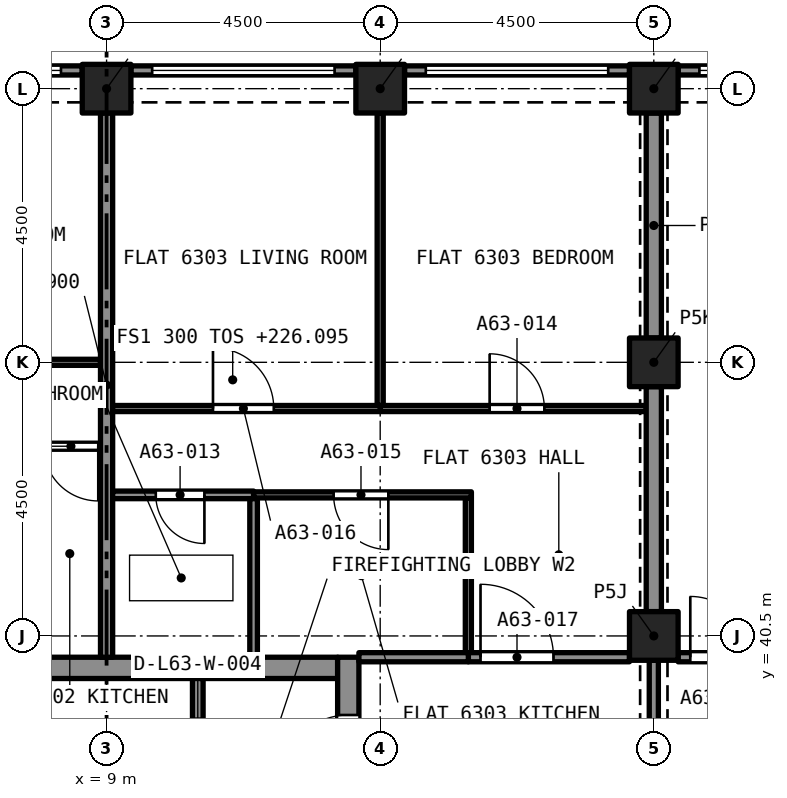
"""IFC4 building model, lengths in metres.
Left out: names, types, materials, properties, quantities, classifications, styles, units other than length and angle.
Written with IfcOpenShell. Run it as: python <this file> out.ifc"""

import sys

from ifc_helpers import new_model, si_unit, direction, frame, frame_2d, origin, origin_2d, place, context, subcontext, project, spatial, rectangle, extrude, element, fill, save


model = new_model("IFC4")
c1 = context("Model", 3, precision=1e-05, world=origin(), true_north=direction((0.0, 1.0)))
c2 = subcontext(c1, "Body", "Model", "MODEL_VIEW")
j1 = project(units=[si_unit("LENGTHUNIT", "METRE"), si_unit("PLANEANGLEUNIT", "RADIAN")], contexts=[c1])
p1 = place(None, origin())
s1 = spatial("IfcSite", under=j1, at=p1, CompositionType="ELEMENT")
p2 = place(p1, origin())
s2 = spatial("IfcBuilding", under=s1, at=p2, CompositionType="ELEMENT")
p3 = place(p2, frame((0.0, 0.0, 226.095)))
s3 = spatial("IfcBuildingStorey", under=s2, at=p3, CompositionType="ELEMENT", Elevation=226.095)
for number, where, z_axis, x_axis in (
    (1, (18.0, 40.5, 0.0), (0.0, 0.0, 1.0), (1.0, 0.0, 0.0)),
    (2, (18.0, 45.0, 0.0), (0.0, 0.0, 1.0), (1.0, 0.0, 0.0)),
    (3, (9.0, 49.5, 0.0), (0.0, 0.0, 1.0), (1.0, 0.0, 0.0)),
    (4, (13.5, 49.5, 0.0), (0.0, 0.0, 1.0), (1.0, 0.0, 0.0)),
    (5, (18.0, 49.5, 0.0), (0.0, 0.0, 1.0), (1.0, 0.0, 0.0)),
):
    element("IfcColumn", number, at=place(p3, frame(where, z_axis=z_axis, x_axis=x_axis)), inside=s3, PredefinedType="COLUMN", context=c2, shape_type="SweptSolid", body=[
        extrude(rectangle(XDim=0.8, YDim=0.8, at=origin_2d()), origin(), (0.0, 0.0, 1.0), 3.2),
    ])
p4 = place(p3, frame((5.2, 39.975, 0.0), z_axis=(0.0, 0.0, 1.0), x_axis=(1.0, 0.0, 0.0)))
e6 = element("IfcWall", 6, at=p4, inside=s3, PredefinedType="SOLIDWALL", context=c2, shape_type="SweptSolid", body=[
    extrude(rectangle(XDim=7.6, YDim=0.35, at=frame_2d((3.8, 0.0))), origin(), (0.0, 0.0, 1.0), 3.2),
])
p5 = place(p3, frame((12.975, 27.35, 0.0), z_axis=(0.0, 0.0, 1.0), x_axis=(0.0, 1.0, 0.0)))
e7 = element("IfcWall", 7, at=p5, inside=s3, PredefinedType="SOLIDWALL", context=c2, shape_type="SweptSolid", body=[
    extrude(rectangle(XDim=12.8, YDim=0.35, at=frame_2d((6.4, 0.0))), origin(), (0.0, 0.0, 1.0), 3.2),
])
p6 = place(p5, frame((10.75, 0.0, 0.0)))
e8 = element("IfcOpeningElement", 8, at=p6, cuts=e7, PredefinedType="OPENING", context=c2, shape_type="SweptSolid", body=[
    extrude(rectangle(XDim=1.1, YDim=2.1, at=frame_2d((0.55, 1.05))), frame((0.0, 0.185, 0.0), z_axis=(0.0, -1.0, 0.0), x_axis=(1.0, 0.0, 0.0)), (0.0, 0.0, 1.0), 0.37),
])
p7 = place(p5, frame((8.6, 0.0, 0.0)))
e9 = element("IfcOpeningElement", 9, at=p7, cuts=e7, PredefinedType="OPENING", context=c2, shape_type="SweptSolid", body=[
    extrude(rectangle(XDim=1.2, YDim=2.1, at=frame_2d((0.6, 1.05))), frame((0.0, 0.185, 0.0), z_axis=(0.0, -1.0, 0.0), x_axis=(1.0, 0.0, 0.0)), (0.0, 0.0, 1.0), 0.37),
])
p8 = place(p3, frame((18.4, 49.8, 0.0), z_axis=(0.0, 0.0, 1.0), x_axis=(1.0, 0.0, 0.0)))
e10 = element("IfcWall", 10, at=p8, inside=s3, PredefinedType="SOLIDWALL", context=c2, shape_type="SweptSolid", body=[
    extrude(rectangle(XDim=3.7, YDim=0.15, at=frame_2d((1.85, 0.0))), origin(), (0.0, 0.0, 1.0), 3.2),
])
p9 = place(p8, frame((0.35, 0.0, 0.45)))
e11 = element("IfcOpeningElement", 11, at=p9, cuts=e10, PredefinedType="OPENING", context=c2, shape_type="SweptSolid", body=[
    extrude(rectangle(XDim=3.0, YDim=1.95, at=frame_2d((1.5, 0.975))), frame((0.0, 0.085, 0.0), z_axis=(0.0, -1.0, 0.0), x_axis=(1.0, 0.0, 0.0)), (0.0, 0.0, 1.0), 0.17),
])
p10 = place(p3, frame((13.9, 49.8, 0.0), z_axis=(0.0, 0.0, 1.0), x_axis=(1.0, 0.0, 0.0)))
e12 = element("IfcWall", 12, at=p10, inside=s3, PredefinedType="SOLIDWALL", context=c2, shape_type="SweptSolid", body=[
    extrude(rectangle(XDim=3.7, YDim=0.15, at=frame_2d((1.85, 0.0))), origin(), (0.0, 0.0, 1.0), 3.2),
])
p11 = place(p10, frame((0.35, 0.0, 0.45)))
e13 = element("IfcOpeningElement", 13, at=p11, cuts=e12, PredefinedType="OPENING", context=c2, shape_type="SweptSolid", body=[
    extrude(rectangle(XDim=3.0, YDim=1.95, at=frame_2d((1.5, 0.975))), frame((0.0, 0.085, 0.0), z_axis=(0.0, -1.0, 0.0), x_axis=(1.0, 0.0, 0.0)), (0.0, 0.0, 1.0), 0.17),
])
p12 = place(p3, frame((9.4, 49.8, 0.0), z_axis=(0.0, 0.0, 1.0), x_axis=(1.0, 0.0, 0.0)))
e14 = element("IfcWall", 14, at=p12, inside=s3, PredefinedType="SOLIDWALL", context=c2, shape_type="SweptSolid", body=[
    extrude(rectangle(XDim=3.7, YDim=0.15, at=frame_2d((1.85, 0.0))), origin(), (0.0, 0.0, 1.0), 3.2),
])
p13 = place(p12, frame((0.35, 0.0, 0.45)))
e15 = element("IfcOpeningElement", 15, at=p13, cuts=e14, PredefinedType="OPENING", context=c2, shape_type="SweptSolid", body=[
    extrude(rectangle(XDim=3.0, YDim=1.95, at=frame_2d((1.5, 0.975))), frame((0.0, 0.085, 0.0), z_axis=(0.0, -1.0, 0.0), x_axis=(1.0, 0.0, 0.0)), (0.0, 0.0, 1.0), 0.17),
])
p14 = place(p3, frame((4.9, 49.8, 0.0), z_axis=(0.0, 0.0, 1.0), x_axis=(1.0, 0.0, 0.0)))
e16 = element("IfcWall", 16, at=p14, inside=s3, PredefinedType="SOLIDWALL", context=c2, shape_type="SweptSolid", body=[
    extrude(rectangle(XDim=3.7, YDim=0.15, at=frame_2d((1.85, 0.0))), origin(), (0.0, 0.0, 1.0), 3.2),
])
p15 = place(p14, frame((0.35, 0.0, 0.45)))
e17 = element("IfcOpeningElement", 17, at=p15, cuts=e16, PredefinedType="OPENING", context=c2, shape_type="SweptSolid", body=[
    extrude(rectangle(XDim=3.0, YDim=1.95, at=frame_2d((1.5, 0.975))), frame((0.0, 0.085, 0.0), z_axis=(0.0, -1.0, 0.0), x_axis=(1.0, 0.0, 0.0)), (0.0, 0.0, 1.0), 0.17),
])
p16 = place(p3, frame((4.5, 45.0, 0.0), z_axis=(0.0, 0.0, 1.0), x_axis=(1.0, 0.0, 0.0)))
e18 = element("IfcWall", 18, at=p16, inside=s3, PredefinedType="PARTITIONING", context=c2, shape_type="SweptSolid", body=[
    extrude(rectangle(XDim=4.4, YDim=0.1, at=frame_2d((2.2, 0.0))), origin(), (0.0, 0.0, 1.0), 2.9),
])
p17 = place(p16, frame((1.8, 0.0, 0.0)))
e19 = element("IfcOpeningElement", 19, at=p17, cuts=e18, PredefinedType="OPENING", context=c2, shape_type="SweptSolid", body=[
    extrude(rectangle(XDim=0.9, YDim=2.1, at=frame_2d((0.45, 1.05))), frame((0.0, 0.06, 0.0), z_axis=(0.0, -1.0, 0.0), x_axis=(1.0, 0.0, 0.0)), (0.0, 0.0, 1.0), 0.12),
])
p18 = place(p3, frame((8.9, 43.62, 0.0), z_axis=(0.0, 0.0, 1.0), x_axis=(-1.0, 0.0, 0.0)))
e20 = element("IfcWall", 20, at=p18, inside=s3, PredefinedType="PARTITIONING", context=c2, shape_type="SweptSolid", body=[
    extrude(rectangle(XDim=1.073, YDim=0.1, at=frame_2d((0.536, 0.0))), origin(), (0.0, 0.0, 1.0), 2.9),
])
p19 = place(p18, frame((0.036, 0.0, 0.0)))
e21 = element("IfcOpeningElement", 21, at=p19, cuts=e20, PredefinedType="OPENING", context=c2, shape_type="SweptSolid", body=[
    extrude(rectangle(XDim=0.9, YDim=2.1, at=frame_2d((0.45, 1.05))), frame((0.0, 0.06, 0.0), z_axis=(0.0, -1.0, 0.0), x_axis=(1.0, 0.0, 0.0)), (0.0, 0.0, 1.0), 0.12),
])
p20 = place(p3, frame((9.0, 40.15, 0.0), z_axis=(0.0, 0.0, 1.0), x_axis=(0.0, 1.0, 0.0)))
e22 = element("IfcWall", 22, at=p20, inside=s3, PredefinedType="PARTITIONING", context=c2, shape_type="SweptSolid", body=[
    extrude(rectangle(XDim=8.95, YDim=0.2, at=frame_2d((4.475, 0.0))), origin(), (0.0, 0.0, 1.0), 2.9),
])
p21 = place(p3, frame((11.418, 42.82, 0.0), z_axis=(0.0, 0.0, 1.0), x_axis=(-1.0, 0.0, 0.0)))
e23 = element("IfcWall", 23, at=p21, inside=s3, PredefinedType="PARTITIONING", context=c2, shape_type="SweptSolid", body=[
    extrude(rectangle(XDim=2.318, YDim=0.125, at=frame_2d((1.159, 0.0))), origin(), (0.0, 0.0, 1.0), 2.9),
])
p22 = place(p21, frame((0.809, 0.0, 0.0)))
e24 = element("IfcOpeningElement", 24, at=p22, cuts=e23, PredefinedType="OPENING", context=c2, shape_type="SweptSolid", body=[
    extrude(rectangle(XDim=0.8, YDim=2.1, at=frame_2d((0.4, 1.05))), frame((0.0, 0.073, 0.0), z_axis=(0.0, -1.0, 0.0), x_axis=(1.0, 0.0, 0.0)), (0.0, 0.0, 1.0), 0.145),
])
p23 = place(p3, frame((11.418, 40.15, 0.0), z_axis=(0.0, 0.0, 1.0), x_axis=(0.0, 1.0, 0.0)))
e25 = element("IfcWall", 25, at=p23, inside=s3, PredefinedType="PARTITIONING", context=c2, shape_type="SweptSolid", body=[
    extrude(rectangle(XDim=2.608, YDim=0.125, at=frame_2d((1.304, 0.0))), origin(), (0.0, 0.0, 1.0), 2.9),
])
p24 = place(p3, frame((13.5, 44.24, 0.0), z_axis=(0.0, 0.0, 1.0), x_axis=(1.0, 0.0, 0.0)))
e26 = element("IfcWall", 26, at=p24, inside=s3, PredefinedType="PARTITIONING", context=c2, shape_type="SweptSolid", body=[
    extrude(rectangle(XDim=4.375, YDim=0.1, at=frame_2d((2.188, 0.0))), origin(), (0.0, 0.0, 1.0), 2.9),
])
p25 = place(p24, frame((1.8, 0.0, 0.0)))
e27 = element("IfcOpeningElement", 27, at=p25, cuts=e26, PredefinedType="OPENING", context=c2, shape_type="SweptSolid", body=[
    extrude(rectangle(XDim=0.9, YDim=2.1, at=frame_2d((0.45, 1.05))), frame((0.0, 0.06, 0.0), z_axis=(0.0, -1.0, 0.0), x_axis=(1.0, 0.0, 0.0)), (0.0, 0.0, 1.0), 0.12),
])
p26 = place(p3, frame((13.5, 44.29, 0.0), z_axis=(0.0, 0.0, 1.0), x_axis=(0.0, 1.0, 0.0)))
e28 = element("IfcWall", 28, at=p26, inside=s3, PredefinedType="PARTITIONING", context=c2, shape_type="SweptSolid", body=[
    extrude(rectangle(XDim=4.81, YDim=0.1, at=frame_2d((2.405, 0.0))), origin(), (0.0, 0.0, 1.0), 2.9),
])
p27 = place(p3, frame((18.0, 45.4, 0.0), z_axis=(0.0, 0.0, 1.0), x_axis=(0.0, 1.0, 0.0)))
e29 = element("IfcWall", 29, at=p27, inside=s3, PredefinedType="PARTITIONING", context=c2, shape_type="SweptSolid", body=[
    extrude(rectangle(XDim=3.7, YDim=0.25, at=frame_2d((1.85, 0.0))), origin(), (0.0, 0.0, 1.0), 2.38),
])
p28 = place(p3, frame((14.95, 40.225, 0.0), z_axis=(0.0, 0.0, 1.0), x_axis=(0.0, 1.0, 0.0)))
e30 = element("IfcWall", 30, at=p28, inside=s3, PredefinedType="PARTITIONING", context=c2, shape_type="SweptSolid", body=[
    extrude(rectangle(XDim=2.545, YDim=0.1, at=frame_2d((1.272, 0.0))), origin(), (0.0, 0.0, 1.0), 2.9),
])
p29 = place(p3, frame((15.0, 42.82, 0.0), z_axis=(0.0, 0.0, 1.0), x_axis=(-1.0, 0.0, 0.0)))
e31 = element("IfcWall", 31, at=p29, inside=s3, PredefinedType="PARTITIONING", context=c2, shape_type="SweptSolid", body=[
    extrude(rectangle(XDim=3.582, YDim=0.1, at=frame_2d((1.791, 0.0))), origin(), (0.0, 0.0, 1.0), 2.9),
])
p30 = place(p29, frame((1.366, 0.0, 0.0)))
e32 = element("IfcOpeningElement", 32, at=p30, cuts=e31, PredefinedType="OPENING", context=c2, shape_type="SweptSolid", body=[
    extrude(rectangle(XDim=0.9, YDim=2.1, at=frame_2d((0.45, 1.05))), frame((0.0, 0.06, 0.0), z_axis=(0.0, -1.0, 0.0), x_axis=(1.0, 0.0, 0.0)), (0.0, 0.0, 1.0), 0.12),
])
p31 = place(p3, frame((9.1, 44.24, 0.0), z_axis=(0.0, 0.0, 1.0), x_axis=(1.0, 0.0, 0.0)))
e33 = element("IfcWall", 33, at=p31, inside=s3, PredefinedType="PARTITIONING", context=c2, shape_type="SweptSolid", body=[
    extrude(rectangle(XDim=4.4, YDim=0.1, at=frame_2d((2.2, 0.0))), origin(), (0.0, 0.0, 1.0), 2.9),
])
p32 = place(p31, frame((1.65, 0.0, 0.0)))
e34 = element("IfcOpeningElement", 34, at=p32, cuts=e33, PredefinedType="OPENING", context=c2, shape_type="SweptSolid", body=[
    extrude(rectangle(XDim=1.0, YDim=2.1, at=frame_2d((0.5, 1.05))), frame((0.0, 0.06, 0.0), z_axis=(0.0, -1.0, 0.0), x_axis=(1.0, 0.0, 0.0)), (0.0, 0.0, 1.0), 0.12),
])
p33 = place(p3, frame((18.0, 40.9, 0.0), z_axis=(0.0, 0.0, 1.0), x_axis=(0.0, 1.0, 0.0)))
e35 = element("IfcWall", 35, at=p33, inside=s3, PredefinedType="PARTITIONING", context=c2, shape_type="SweptSolid", body=[
    extrude(rectangle(XDim=3.7, YDim=0.25, at=frame_2d((1.85, 0.0))), origin(), (0.0, 0.0, 1.0), 2.38),
])
p34 = place(p3, frame((14.95, 40.15, 0.0), z_axis=(0.0, 0.0, 1.0), x_axis=(1.0, 0.0, 0.0)))
e36 = element("IfcWall", 36, at=p34, inside=s3, PredefinedType="PARTITIONING", context=c2, shape_type="SweptSolid", body=[
    extrude(rectangle(XDim=2.65, YDim=0.15, at=frame_2d((1.325, 0.0))), origin(), (0.0, 0.0, 1.0), 2.9),
])
p35 = place(p34, frame((0.2, 0.0, 0.0)))
e37 = element("IfcOpeningElement", 37, at=p35, cuts=e36, PredefinedType="OPENING", context=c2, shape_type="SweptSolid", body=[
    extrude(rectangle(XDim=1.2, YDim=2.4, at=frame_2d((0.6, 1.2))), frame((0.0, 0.085, 0.0), z_axis=(0.0, -1.0, 0.0), x_axis=(1.0, 0.0, 0.0)), (0.0, 0.0, 1.0), 0.17),
])
p36 = place(p3, frame((13.15, 40.15, 0.0), z_axis=(0.0, 0.0, 1.0), x_axis=(1.0, 0.0, 0.0)))
e38 = element("IfcWall", 38, at=p36, inside=s3, PredefinedType="PARTITIONING", context=c2, shape_type="SweptSolid", body=[
    extrude(rectangle(XDim=1.8, YDim=0.15, at=frame_2d((0.9, 0.0))), origin(), (0.0, 0.0, 1.0), 2.9),
])
p37 = place(p3, frame((18.4, 40.15, 0.0), z_axis=(0.0, 0.0, 1.0), x_axis=(1.0, 0.0, 0.0)))
e39 = element("IfcWall", 39, at=p37, inside=s3, PredefinedType="PARTITIONING", context=c2, shape_type="SweptSolid", body=[
    extrude(rectangle(XDim=2.2, YDim=0.15, at=frame_2d((1.1, 0.0))), origin(), (0.0, 0.0, 1.0), 2.75),
])
p38 = place(p37, frame((0.2, 0.0, 0.0)))
e40 = element("IfcOpeningElement", 40, at=p38, cuts=e39, PredefinedType="OPENING", context=c2, shape_type="SweptSolid", body=[
    extrude(rectangle(XDim=1.0, YDim=2.1, at=frame_2d((0.5, 1.05))), frame((0.0, 0.085, 0.0), z_axis=(0.0, -1.0, 0.0), x_axis=(1.0, 0.0, 0.0)), (0.0, 0.0, 1.0), 0.17),
])
p39 = place(p3, frame((18.0, 40.1, 0.0), z_axis=(0.0, 0.0, 1.0), x_axis=(0.0, -1.0, 0.0)))
e41 = element("IfcWall", 41, at=p39, inside=s3, PredefinedType="PARTITIONING", context=c2, shape_type="SweptSolid", body=[
    extrude(rectangle(XDim=3.7, YDim=0.15, at=frame_2d((1.85, 0.0))), origin(), (0.0, 0.0, 1.0), 2.38),
])
p40 = place(p39, frame((1.25, 0.0, 0.0)))
e42 = element("IfcOpeningElement", 42, at=p40, cuts=e41, PredefinedType="OPENING", context=c2, shape_type="SweptSolid", body=[
    extrude(rectangle(XDim=1.2, YDim=2.1, at=frame_2d((0.6, 1.05))), frame((0.0, 0.085, 0.0), z_axis=(0.0, -1.0, 0.0), x_axis=(1.0, 0.0, 0.0)), (0.0, 0.0, 1.0), 0.17),
])
p41 = place(p3, frame((10.5, 37.5, 0.0), z_axis=(0.0, 0.0, 1.0), x_axis=(0.0, 1.0, 0.0)))
e43 = element("IfcWall", 43, at=p41, inside=s3, PredefinedType="SOLIDWALL", context=c2, shape_type="SweptSolid", body=[
    extrude(rectangle(XDim=2.3, YDim=0.175, at=frame_2d((1.15, 0.0))), origin(), (0.0, 0.0, 1.0), 2.9),
])
p42 = place(p41, frame((0.65, 0.0, 0.0)))
e44 = element("IfcOpeningElement", 44, at=p42, cuts=e43, PredefinedType="OPENING", context=c2, shape_type="SweptSolid", body=[
    extrude(rectangle(XDim=1.0, YDim=2.1, at=frame_2d((0.5, 1.05))), frame((0.0, 0.097, 0.0), z_axis=(0.0, -1.0, 0.0), x_axis=(1.0, 0.0, 0.0)), (0.0, 0.0, 1.0), 0.195),
])
p43 = place(p9, origin())
e45 = element("IfcWindow", 45, at=p43, inside=s3, PartitioningType="SINGLE_PANEL", PredefinedType="WINDOW", context=c2, shape_type="SweptSolid", body=[
    extrude(rectangle(XDim=3.0, YDim=1.95, at=frame_2d((1.5, 0.975))), frame((0.0, 0.03, 0.0), z_axis=(0.0, -1.0, 0.0), x_axis=(1.0, 0.0, 0.0)), (0.0, 0.0, 1.0), 0.06),
])
fill(e11, e45)
p44 = place(p11, origin())
e46 = element("IfcWindow", 46, at=p44, inside=s3, PartitioningType="SINGLE_PANEL", PredefinedType="WINDOW", context=c2, shape_type="SweptSolid", body=[
    extrude(rectangle(XDim=3.0, YDim=1.95, at=frame_2d((1.5, 0.975))), frame((0.0, 0.03, 0.0), z_axis=(0.0, -1.0, 0.0), x_axis=(1.0, 0.0, 0.0)), (0.0, 0.0, 1.0), 0.06),
])
fill(e13, e46)
p45 = place(p13, origin())
e47 = element("IfcWindow", 47, at=p45, inside=s3, PartitioningType="SINGLE_PANEL", PredefinedType="WINDOW", context=c2, shape_type="SweptSolid", body=[
    extrude(rectangle(XDim=3.0, YDim=1.95, at=frame_2d((1.5, 0.975))), frame((0.0, 0.03, 0.0), z_axis=(0.0, -1.0, 0.0), x_axis=(1.0, 0.0, 0.0)), (0.0, 0.0, 1.0), 0.06),
])
fill(e15, e47)
p46 = place(p15, origin())
e48 = element("IfcWindow", 48, at=p46, inside=s3, PartitioningType="SINGLE_PANEL", PredefinedType="WINDOW", context=c2, shape_type="SweptSolid", body=[
    extrude(rectangle(XDim=3.0, YDim=1.95, at=frame_2d((1.5, 0.975))), frame((0.0, 0.03, 0.0), z_axis=(0.0, -1.0, 0.0), x_axis=(1.0, 0.0, 0.0)), (0.0, 0.0, 1.0), 0.06),
])
fill(e17, e48)
p47 = place(p19, origin())
e49 = element("IfcDoor", 49, at=p47, inside=s3, OperationType="SINGLE_SWING_LEFT", PredefinedType="DOOR", context=c2, shape_type="SweptSolid", body=[
    extrude(rectangle(XDim=0.9, YDim=2.1, at=frame_2d((0.45, 1.05))), frame((0.0, 0.025, 0.0), z_axis=(0.0, -1.0, 0.0), x_axis=(1.0, 0.0, 0.0)), (0.0, 0.0, 1.0), 0.05),
])
fill(e21, e49)
p48 = place(p22, origin())
e50 = element("IfcDoor", 50, at=p48, inside=s3, OperationType="SINGLE_SWING_RIGHT", PredefinedType="DOOR", context=c2, shape_type="SweptSolid", body=[
    extrude(rectangle(XDim=0.8, YDim=2.1, at=frame_2d((0.4, 1.05))), frame((0.0, 0.025, 0.0), z_axis=(0.0, -1.0, 0.0), x_axis=(1.0, 0.0, 0.0)), (0.0, 0.0, 1.0), 0.05),
])
fill(e24, e50)
p49 = place(p25, origin())
e51 = element("IfcDoor", 51, at=p49, inside=s3, OperationType="SINGLE_SWING_RIGHT", PredefinedType="DOOR", context=c2, shape_type="SweptSolid", body=[
    extrude(rectangle(XDim=0.9, YDim=2.1, at=frame_2d((0.45, 1.05))), frame((0.0, 0.025, 0.0), z_axis=(0.0, -1.0, 0.0), x_axis=(1.0, 0.0, 0.0)), (0.0, 0.0, 1.0), 0.05),
])
fill(e27, e51)
p50 = place(p30, origin())
e52 = element("IfcDoor", 52, at=p50, inside=s3, OperationType="SINGLE_SWING_RIGHT", PredefinedType="DOOR", context=c2, shape_type="SweptSolid", body=[
    extrude(rectangle(XDim=0.9, YDim=2.1, at=frame_2d((0.45, 1.05))), frame((0.0, 0.025, 0.0), z_axis=(0.0, -1.0, 0.0), x_axis=(1.0, 0.0, 0.0)), (0.0, 0.0, 1.0), 0.05),
])
fill(e32, e52)
p51 = place(p32, origin())
e53 = element("IfcDoor", 53, at=p51, inside=s3, OperationType="SINGLE_SWING_LEFT", PredefinedType="DOOR", context=c2, shape_type="SweptSolid", body=[
    extrude(rectangle(XDim=1.0, YDim=2.1, at=frame_2d((0.5, 1.05))), frame((0.0, 0.025, 0.0), z_axis=(0.0, -1.0, 0.0), x_axis=(1.0, 0.0, 0.0)), (0.0, 0.0, 1.0), 0.05),
])
fill(e34, e53)
p52 = place(p35, origin())
e54 = element("IfcDoor", 54, at=p52, inside=s3, OperationType="SINGLE_SWING_LEFT", PredefinedType="DOOR", context=c2, shape_type="SweptSolid", body=[
    extrude(rectangle(XDim=1.2, YDim=2.4, at=frame_2d((0.6, 1.2))), frame((0.0, 0.025, 0.0), z_axis=(0.0, -1.0, 0.0), x_axis=(1.0, 0.0, 0.0)), (0.0, 0.0, 1.0), 0.05),
])
fill(e37, e54)
p53 = place(p38, origin())
e55 = element("IfcDoor", 55, at=p53, inside=s3, OperationType="SINGLE_SWING_LEFT", PredefinedType="DOOR", context=c2, shape_type="SweptSolid", body=[
    extrude(rectangle(XDim=1.0, YDim=2.1, at=frame_2d((0.5, 1.05))), frame((0.0, 0.025, 0.0), z_axis=(0.0, -1.0, 0.0), x_axis=(1.0, 0.0, 0.0)), (0.0, 0.0, 1.0), 0.05),
])
fill(e40, e55)
p54 = place(p6, origin())
e56 = element("IfcDoor", 56, at=p54, inside=s3, OperationType="SINGLE_SWING_LEFT", PredefinedType="DOOR", context=c2, shape_type="SweptSolid", body=[
    extrude(rectangle(XDim=1.1, YDim=2.1, at=frame_2d((0.55, 1.05))), frame((0.0, 0.025, 0.0), z_axis=(0.0, -1.0, 0.0), x_axis=(1.0, 0.0, 0.0)), (0.0, 0.0, 1.0), 0.05),
])
fill(e8, e56)
save(model, sys.argv[1])
